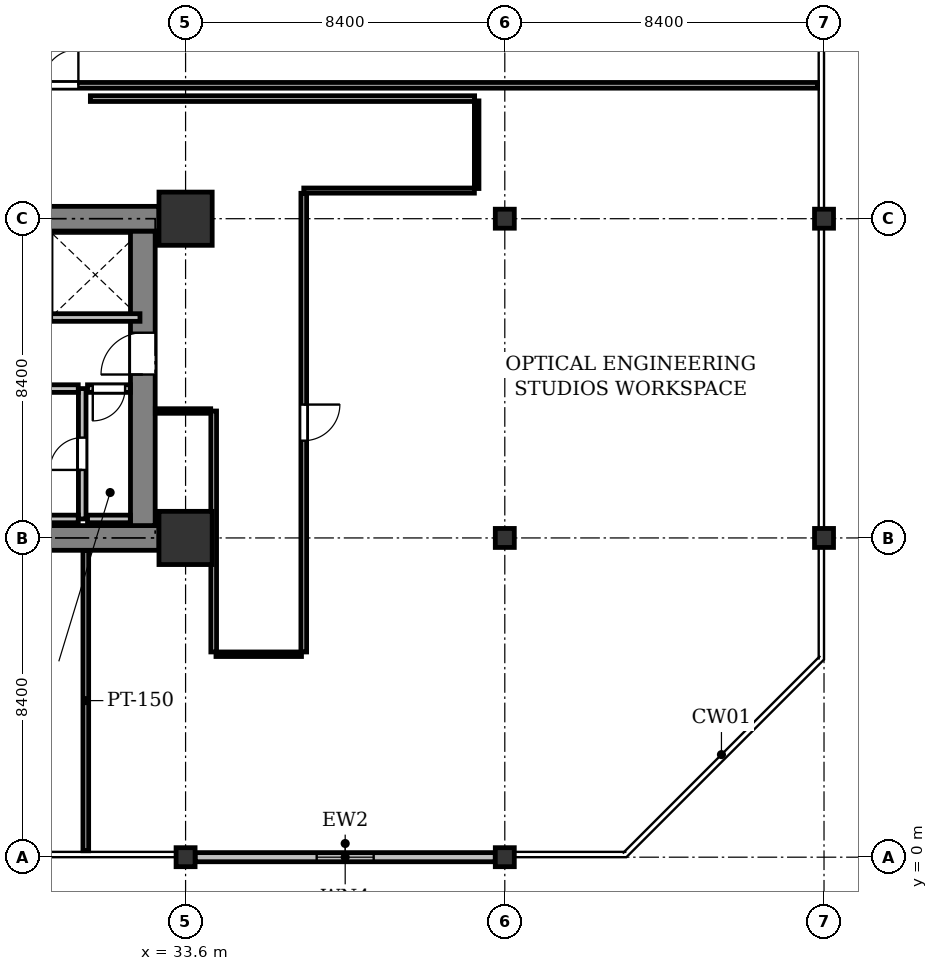
"""IFC4 building model, lengths in metres.
Left out: names, types, materials, properties, quantities, classifications, styles, units other than length and angle.
Written with IfcOpenShell. Run it as: python <this file> out.ifc"""

import sys

from ifc_helpers import new_model, si_unit, direction, frame, frame_2d, origin, origin_2d, place, context, subcontext, project, spatial, rectangle, i_section, extrude, element, fill, save


model = new_model("IFC4")
c1 = context("Model", 3, precision=1e-05, world=origin(), true_north=direction((0.0, 1.0)))
c2 = subcontext(c1, "Body", "Model", "MODEL_VIEW")
j1 = project(units=[si_unit("LENGTHUNIT", "METRE"), si_unit("PLANEANGLEUNIT", "RADIAN")], contexts=[c1])
p1 = place(None, origin())
s1 = spatial("IfcSite", under=j1, at=p1, CompositionType="ELEMENT")
p2 = place(p1, origin())
s2 = spatial("IfcBuilding", under=s1, at=p2, CompositionType="ELEMENT")
p3 = place(p2, frame((0.0, 0.0, 50.0)))
s3 = spatial("IfcBuildingStorey", under=s2, at=p3, CompositionType="ELEMENT", Elevation=50.0)
p4 = place(p3, frame((33.6, 0.0, 0.0), z_axis=(0.0, 0.0, 1.0), x_axis=(1.0, 0.0, 0.0)))
e1 = element("IfcColumn", 1, at=p4, inside=s3, PredefinedType="COLUMN", context=c2, shape_type="SweptSolid", body=[
    extrude(i_section(OverallWidth=0.5, OverallDepth=0.5, WebThickness=0.028, FlangeThickness=0.04, at=origin_2d()), origin(), (0.0, 0.0, 1.0), 4.2),
])
for number, where, z_axis, x_axis in (
    (2, (33.6, 8.4, 0.0), (0.0, 0.0, 1.0), (1.0, 0.0, 0.0)),
    (3, (33.6, 16.8, 0.0), (0.0, 0.0, 1.0), (1.0, 0.0, 0.0)),
):
    element("IfcColumn", number, at=place(p3, frame(where, z_axis=z_axis, x_axis=x_axis)), inside=s3, PredefinedType="COLUMN", context=c2, shape_type="SweptSolid", body=[
        extrude(rectangle(XDim=1.4, YDim=1.4, at=origin_2d()), origin(), (0.0, 0.0, 1.0), 4.2),
    ])
for number, where, z_axis, x_axis in (
    (4, (42.0, 0.0, 0.0), (0.0, 0.0, 1.0), (1.0, 0.0, 0.0)),
    (5, (42.0, 8.4, 0.0), (0.0, 0.0, 1.0), (1.0, 0.0, 0.0)),
    (6, (42.0, 16.8, 0.0), (0.0, 0.0, 1.0), (1.0, 0.0, 0.0)),
    (7, (50.4, 8.4, 0.0), (0.0, 0.0, 1.0), (1.0, 0.0, 0.0)),
    (8, (50.4, 16.8, 0.0), (0.0, 0.0, 1.0), (1.0, 0.0, 0.0)),
):
    element("IfcColumn", number, at=place(p3, frame(where, z_axis=z_axis, x_axis=x_axis)), inside=s3, PredefinedType="COLUMN", context=c2, shape_type="SweptSolid", body=[
        extrude(i_section(OverallWidth=0.5, OverallDepth=0.5, WebThickness=0.028, FlangeThickness=0.04, at=origin_2d()), origin(), (0.0, 0.0, 1.0), 4.2),
    ])
p5 = place(p3, frame((41.75, 0.0, 0.0), z_axis=(0.0, 0.0, 1.0), x_axis=(-1.0, 0.0, 0.0)))
e9 = element("IfcWall", 9, at=p5, inside=s3, PredefinedType="STANDARD", context=c2, shape_type="SweptSolid", body=[
    extrude(rectangle(XDim=7.9, YDim=0.24, at=frame_2d((3.95, 0.0))), origin(), (0.0, 0.0, 1.0), 3.471),
])
p6 = place(p5, frame((3.2, 0.0, 0.9)))
e10 = element("IfcOpeningElement", 10, at=p6, cuts=e9, PredefinedType="OPENING", context=c2, shape_type="SweptSolid", body=[
    extrude(rectangle(XDim=1.5, YDim=1.6, at=frame_2d((0.75, 0.8))), frame((0.0, 0.13, 0.0), z_axis=(0.0, -1.0, 0.0), x_axis=(1.0, 0.0, 0.0)), (0.0, 0.0, 1.0), 0.26),
])
p7 = place(p3, frame((25.9, 8.4, 0.0), z_axis=(0.0, 0.0, 1.0), x_axis=(1.0, 0.0, 0.0)))
e11 = element("IfcWall", 11, at=p7, inside=s3, PredefinedType="SHEAR", context=c2, shape_type="SweptSolid", body=[
    extrude(rectangle(XDim=7.0, YDim=0.65, at=frame_2d((3.5, 0.0))), origin(), (0.0, 0.0, 1.0), 3.925),
])
p8 = place(p3, frame((32.475, 8.725, 0.0), z_axis=(0.0, 0.0, 1.0), x_axis=(0.0, 1.0, 0.0)))
e12 = element("IfcWall", 12, at=p8, inside=s3, PredefinedType="SHEAR", context=c2, shape_type="SweptSolid", body=[
    extrude(rectangle(XDim=7.75, YDim=0.65, at=frame_2d((3.875, 0.0))), origin(), (0.0, 0.0, 1.0), 3.925),
])
p9 = place(p8, frame((3.975, 0.0, 0.0)))
e13 = element("IfcOpeningElement", 13, at=p9, cuts=e12, PredefinedType="OPENING", context=c2, shape_type="SweptSolid", body=[
    extrude(rectangle(XDim=1.1, YDim=2.15, at=frame_2d((0.55, 1.075))), frame((0.0, 0.335, 0.0), z_axis=(0.0, -1.0, 0.0), x_axis=(1.0, 0.0, 0.0)), (0.0, 0.0, 1.0), 0.67),
])
p10 = place(p3, frame((25.9, 16.8, 0.0), z_axis=(0.0, 0.0, 1.0), x_axis=(1.0, 0.0, 0.0)))
e14 = element("IfcWall", 14, at=p10, inside=s3, PredefinedType="SHEAR", context=c2, shape_type="SweptSolid", body=[
    extrude(rectangle(XDim=7.0, YDim=0.65, at=frame_2d((3.5, 0.0))), origin(), (0.0, 0.0, 1.0), 3.925),
])
p11 = place(p3, frame((30.05, 14.2, 0.0), z_axis=(0.0, 0.0, 1.0), x_axis=(1.0, 0.0, 0.0)))
e15 = element("IfcWall", 15, at=p11, inside=s3, PredefinedType="PARTITIONING", context=c2, shape_type="SweptSolid", body=[
    extrude(rectangle(XDim=2.35, YDim=0.2, at=frame_2d((1.175, 0.0))), origin(), (0.0, 0.0, 1.0), 3.925),
])
p12 = place(p3, frame((30.88, 8.9, 0.0), z_axis=(0.0, 0.0, 1.0), x_axis=(0.0, 1.0, 0.0)))
e16 = element("IfcWall", 16, at=p12, inside=s3, PredefinedType="PARTITIONING", context=c2, shape_type="SweptSolid", body=[
    extrude(rectangle(XDim=3.43, YDim=0.2, at=frame_2d((1.715, 0.0))), origin(), (0.0, 0.0, 1.0), 3.925),
])
p13 = place(p12, frame((1.29, 0.0, 0.0)))
e17 = element("IfcOpeningElement", 17, at=p13, cuts=e16, PredefinedType="OPENING", context=c2, shape_type="SweptSolid", body=[
    extrude(rectangle(XDim=0.85, YDim=2.15, at=frame_2d((0.425, 1.075))), frame((0.0, 0.11, 0.0), z_axis=(0.0, -1.0, 0.0), x_axis=(1.0, 0.0, 0.0)), (0.0, 0.0, 1.0), 0.22),
])
for number, where, z_axis, x_axis in (
    (18, (30.776, 12.33, 0.0), (0.0, 0.0, 1.0), (-1.0, 0.0, 0.0)),
    (19, (29.85, 8.9, 0.0), (0.0, 0.0, 1.0), (1.0, 0.0, 0.0)),
):
    element("IfcWall", number, at=place(p3, frame(where, z_axis=z_axis, x_axis=x_axis)), inside=s3, PredefinedType="PARTITIONING", context=c2, shape_type="SweptSolid", body=[
        extrude(rectangle(XDim=0.926, YDim=0.2, at=frame_2d((0.463, 0.0))), origin(), (0.0, 0.0, 1.0), 3.925),
    ])
p14 = place(p3, frame((32.146, 12.33, 0.0), z_axis=(0.0, 0.0, 1.0), x_axis=(-1.0, 0.0, 0.0)))
e20 = element("IfcWall", 20, at=p14, inside=s3, PredefinedType="PARTITIONING", context=c2, shape_type="SweptSolid", body=[
    extrude(rectangle(XDim=1.126, YDim=0.2, at=frame_2d((0.563, 0.0))), origin(), (0.0, 0.0, 1.0), 3.925),
])
p15 = place(p14, frame((0.138, 0.0, 0.0)))
e21 = element("IfcOpeningElement", 21, at=p15, cuts=e20, PredefinedType="OPENING", context=c2, shape_type="SweptSolid", body=[
    extrude(rectangle(XDim=0.85, YDim=2.15, at=frame_2d((0.425, 1.075))), frame((0.0, 0.11, 0.0), z_axis=(0.0, -1.0, 0.0), x_axis=(1.0, 0.0, 0.0)), (0.0, 0.0, 1.0), 0.22),
])
p16 = place(p3, frame((31.02, 8.9, 0.0), z_axis=(0.0, 0.0, 1.0), x_axis=(1.0, 0.0, 0.0)))
e22 = element("IfcWall", 22, at=p16, inside=s3, PredefinedType="PARTITIONING", context=c2, shape_type="SweptSolid", body=[
    extrude(rectangle(XDim=1.126, YDim=0.2, at=frame_2d((0.563, 0.0))), origin(), (0.0, 0.0, 1.0), 3.925),
])
p17 = place(p3, frame((30.975, 0.169, 0.0), z_axis=(0.0, 0.0, 1.0), x_axis=(0.0, 1.0, 0.0)))
e23 = element("IfcWall", 23, at=p17, inside=s3, PredefinedType="PARTITIONING", context=c2, shape_type="SweptSolid", body=[
    extrude(rectangle(XDim=7.902, YDim=0.15, at=frame_2d((3.951, 0.0))), origin(), (0.0, 0.0, 1.0), 3.925),
])
p18 = place(p3, frame((20.039, 20.31, 0.0), z_axis=(0.0, 0.0, 1.0), x_axis=(1.0, 0.0, 0.0)))
e24 = element("IfcWall", 24, at=p18, inside=s3, PredefinedType="PARTITIONING", context=c2, shape_type="SweptSolid", body=[
    extrude(rectangle(XDim=30.192, YDim=0.15, at=frame_2d((15.096, 0.0))), origin(), (0.0, 0.0, 1.0), 3.323),
])
p19 = place(p18, frame((9.79, 0.0, 0.0)))
e25 = element("IfcOpeningElement", 25, at=p19, cuts=e24, PredefinedType="OPENING", context=c2, shape_type="SweptSolid", body=[
    extrude(rectangle(XDim=0.95, YDim=2.15, at=frame_2d((0.475, 1.075))), frame((0.0, 0.085, 0.0), z_axis=(0.0, -1.0, 0.0), x_axis=(1.0, 0.0, 0.0)), (0.0, 0.0, 1.0), 0.17),
])
p20 = place(p3, frame((31.094, 19.96, 0.0), z_axis=(0.0, 0.0, 1.0), x_axis=(1.0, 0.0, 0.0)))
e26 = element("IfcWall", 26, at=p20, inside=s3, PredefinedType="PARTITIONING", context=c2, shape_type="SweptSolid", body=[
    extrude(rectangle(XDim=10.111, YDim=0.15, at=frame_2d((5.056, 0.0))), origin(), (0.0, 0.0, 1.0), 3.323),
])
p21 = place(p3, frame((41.26, 19.9, 0.0), z_axis=(0.0, 0.0, 1.0), x_axis=(-0.000105876124, -0.999999994395, 0.0)))
e27 = element("IfcWall", 27, at=p21, inside=s3, PredefinedType="PARTITIONING", context=c2, shape_type="SweptSolid", body=[
    extrude(rectangle(XDim=2.306, YDim=0.12, at=frame_2d((1.153, 0.0))), origin(), (0.0, 0.0, 1.0), 3.925),
])
p22 = place(p3, frame((41.2, 17.54, 0.0), z_axis=(0.0, 0.0, 1.0), x_axis=(-1.0, 0.0, 0.0)))
e28 = element("IfcWall", 28, at=p22, inside=s3, PredefinedType="PARTITIONING", context=c2, shape_type="SweptSolid", body=[
    extrude(rectangle(XDim=4.49, YDim=0.135, at=frame_2d((2.245, 0.0))), origin(), (0.0, 0.0, 1.0), 3.566),
])
p23 = place(p3, frame((36.71, 17.469, 0.0), z_axis=(0.0, 0.0, 1.0), x_axis=(0.0, -1.0, 0.0)))
e29 = element("IfcWall", 29, at=p23, inside=s3, PredefinedType="PARTITIONING", context=c2, shape_type="SweptSolid", body=[
    extrude(rectangle(XDim=12.069, YDim=0.15, at=frame_2d((6.034, 0.0))), origin(), (0.0, 0.0, 1.0), 3.313),
])
p24 = place(p23, frame((5.559, 0.0, 0.0)))
e30 = element("IfcOpeningElement", 30, at=p24, cuts=e29, PredefinedType="OPENING", context=c2, shape_type="SweptSolid", body=[
    extrude(rectangle(XDim=0.95, YDim=2.15, at=frame_2d((0.475, 1.075))), frame((0.0, 0.085, 0.0), z_axis=(0.0, -1.0, 0.0), x_axis=(1.0, 0.0, 0.0)), (0.0, 0.0, 1.0), 0.17),
])
p25 = place(p3, frame((36.65, 5.34, 0.0), z_axis=(0.0, 0.0, 1.0), x_axis=(-1.0, 0.0, 0.0)))
e31 = element("IfcWall", 31, at=p25, inside=s3, PredefinedType="PARTITIONING", context=c2, shape_type="SweptSolid", body=[
    extrude(rectangle(XDim=2.25, YDim=0.12, at=frame_2d((1.125, 0.0))), origin(), (0.0, 0.0, 1.0), 3.925),
])
p26 = place(p3, frame((34.34, 5.4, 0.0), z_axis=(0.0, 0.0, 1.0), x_axis=(0.0, 1.0, 0.0)))
e32 = element("IfcWall", 32, at=p26, inside=s3, PredefinedType="PARTITIONING", context=c2, shape_type="SweptSolid", body=[
    extrude(rectangle(XDim=6.34, YDim=0.15, at=frame_2d((3.17, 0.0))), origin(), (0.0, 0.0, 1.0), 3.313),
])
p27 = place(p3, frame((34.261, 11.74, 0.0), z_axis=(0.0, 0.0, 1.0), x_axis=(-1.0, 0.0, 0.0)))
e33 = element("IfcWall", 33, at=p27, inside=s3, PredefinedType="PARTITIONING", context=c2, shape_type="SweptSolid", body=[
    extrude(rectangle(XDim=1.457, YDim=0.12, at=frame_2d((0.729, 0.0))), origin(), (0.0, 0.0, 1.0), 3.323),
])
p28 = place(p6, origin())
e34 = element("IfcWindow", 34, at=p28, inside=s3, PartitioningType="SINGLE_PANEL", PredefinedType="WINDOW", context=c2, shape_type="SweptSolid", body=[
    extrude(rectangle(XDim=1.5, YDim=1.6, at=frame_2d((0.75, 0.8))), frame((0.0, 0.03, 0.0), z_axis=(0.0, -1.0, 0.0), x_axis=(1.0, 0.0, 0.0)), (0.0, 0.0, 1.0), 0.06),
])
fill(e10, e34)
p29 = place(p9, origin())
e35 = element("IfcDoor", 35, at=p29, inside=s3, OperationType="SINGLE_SWING_LEFT", PredefinedType="DOOR", context=c2, shape_type="SweptSolid", body=[
    extrude(rectangle(XDim=1.1, YDim=2.15, at=frame_2d((0.55, 1.075))), frame((0.0, 0.025, 0.0), z_axis=(0.0, -1.0, 0.0), x_axis=(1.0, 0.0, 0.0)), (0.0, 0.0, 1.0), 0.05),
])
fill(e13, e35)
p30 = place(p13, origin())
e36 = element("IfcDoor", 36, at=p30, inside=s3, OperationType="SINGLE_SWING_LEFT", PredefinedType="DOOR", context=c2, shape_type="SweptSolid", body=[
    extrude(rectangle(XDim=0.85, YDim=2.15, at=frame_2d((0.425, 1.075))), frame((0.0, 0.025, 0.0), z_axis=(0.0, -1.0, 0.0), x_axis=(1.0, 0.0, 0.0)), (0.0, 0.0, 1.0), 0.05),
])
fill(e17, e36)
p31 = place(p15, origin())
e37 = element("IfcDoor", 37, at=p31, inside=s3, OperationType="SINGLE_SWING_RIGHT", PredefinedType="DOOR", context=c2, shape_type="SweptSolid", body=[
    extrude(rectangle(XDim=0.85, YDim=2.15, at=frame_2d((0.425, 1.075))), frame((0.0, 0.025, 0.0), z_axis=(0.0, -1.0, 0.0), x_axis=(1.0, 0.0, 0.0)), (0.0, 0.0, 1.0), 0.05),
])
fill(e21, e37)
p32 = place(p19, origin())
e38 = element("IfcDoor", 38, at=p32, inside=s3, OperationType="SINGLE_SWING_RIGHT", PredefinedType="DOOR", context=c2, shape_type="SweptSolid", body=[
    extrude(rectangle(XDim=0.95, YDim=2.15, at=frame_2d((0.475, 1.075))), frame((0.0, 0.025, 0.0), z_axis=(0.0, -1.0, 0.0), x_axis=(1.0, 0.0, 0.0)), (0.0, 0.0, 1.0), 0.05),
])
fill(e25, e38)
p33 = place(p24, origin())
e39 = element("IfcDoor", 39, at=p33, inside=s3, OperationType="SINGLE_SWING_LEFT", PredefinedType="DOOR", context=c2, shape_type="SweptSolid", body=[
    extrude(rectangle(XDim=0.95, YDim=2.15, at=frame_2d((0.475, 1.075))), frame((0.0, 0.025, 0.0), z_axis=(0.0, -1.0, 0.0), x_axis=(1.0, 0.0, 0.0)), (0.0, 0.0, 1.0), 0.05),
])
fill(e30, e39)
save(model, sys.argv[1])
